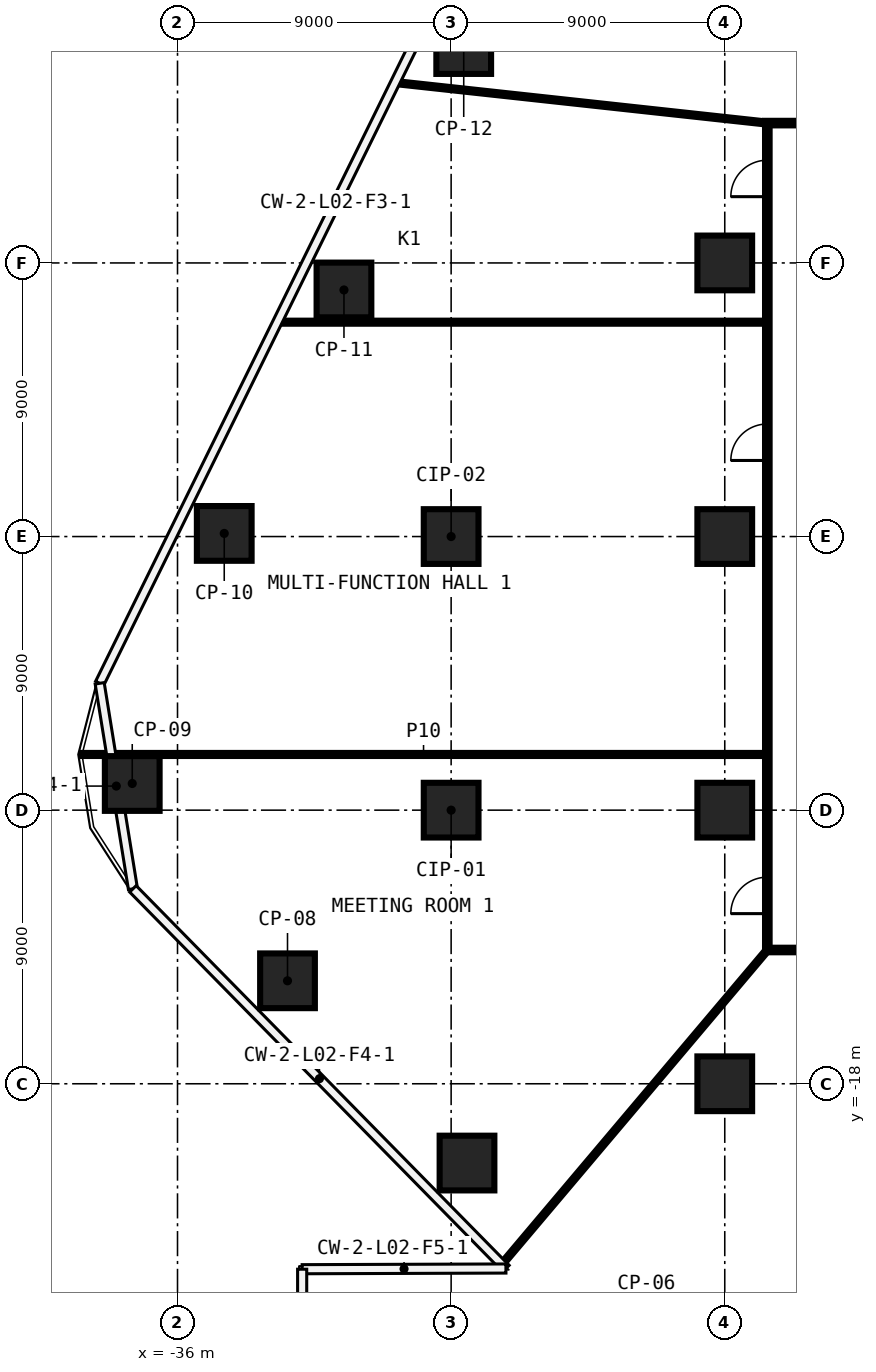
"""IFC4 building model, lengths in metres.
Left out: names, types, materials, properties, quantities, classifications, styles, units other than length and angle.
Written with IfcOpenShell. Run it as: python <this file> out.ifc"""

import sys

from ifc_helpers import new_model, si_unit, direction, frame, frame_2d, origin, origin_2d, place, context, subcontext, project, spatial, rectangle, extrude, element, fill, save


model = new_model("IFC4")
c1 = context("Model", 3, precision=1e-05, world=origin(), true_north=direction((0.0, 1.0)))
c2 = subcontext(c1, "Body", "Model", "MODEL_VIEW")
j1 = project(units=[si_unit("LENGTHUNIT", "METRE"), si_unit("PLANEANGLEUNIT", "RADIAN")], contexts=[c1])
p1 = place(None, origin())
s1 = spatial("IfcSite", under=j1, at=p1, CompositionType="ELEMENT")
p2 = place(p1, origin())
s2 = spatial("IfcBuilding", under=s1, at=p2, CompositionType="ELEMENT")
p3 = place(p2, frame((0.0, 0.0, 19.0)))
s3 = spatial("IfcBuildingStorey", under=s2, at=p3, CompositionType="ELEMENT", Elevation=19.0)
for number, where, z_axis, x_axis in (
    (1, (-26.478, -20.608, 0.0), (0.0, 0.0, 1.0), (1.0, 0.0, 0.0)),
    (2, (-32.382, -14.613, 0.0), (0.0, 0.0, 1.0), (1.0, 0.0, 0.0)),
    (3, (-37.489, -8.123, 0.0), (0.0, 0.0, 1.0), (1.0, 0.0, 0.0)),
    (4, (-34.463, 0.103, 0.0), (0.0, 0.0, 1.0), (1.0, 0.0, 0.0)),
    (5, (-30.525, 8.111, 0.0), (0.0, 0.0, 1.0), (1.0, 0.0, 0.0)),
    (6, (-26.586, 16.118, 0.0), (0.0, 0.0, 1.0), (1.0, 0.0, 0.0)),
    (7, (-27.0, -9.0, 0.0), (0.0, 0.0, 1.0), (1.0, 0.0, 0.0)),
    (8, (-27.0, 0.0, 0.0), (0.0, 0.0, 1.0), (1.0, 0.0, 0.0)),
    (9, (-18.0, -18.0, 0.0), (0.0, 0.0, 1.0), (1.0, 0.0, 0.0)),
    (10, (-18.0, -9.0, 0.0), (0.0, 0.0, 1.0), (1.0, 0.0, 0.0)),
    (11, (-18.0, 0.0, 0.0), (0.0, 0.0, 1.0), (1.0, 0.0, 0.0)),
    (12, (-18.0, 9.0, 0.0), (0.0, 0.0, 1.0), (1.0, 0.0, 0.0)),
):
    element("IfcColumn", number, at=place(p3, frame(where, z_axis=z_axis, x_axis=x_axis)), inside=s3, PredefinedType="COLUMN", context=c2, shape_type="SweptSolid", body=[
        extrude(rectangle(XDim=1.8, YDim=1.8, at=origin_2d()), origin(), (0.0, 0.0, 1.0), 7.55),
    ])
p4 = place(p3, frame((16.675, -13.6, 0.0), z_axis=(0.0, 0.0, 1.0), x_axis=(-1.0, 0.0, 0.0)))
e13 = element("IfcWall", 13, at=p4, inside=s3, PredefinedType="PARTITIONING", context=c2, shape_type="SweptSolid", body=[
    extrude(rectangle(XDim=33.35, YDim=0.15, at=frame_2d((16.675, 0.0))), origin(), (0.0, 0.0, 1.0), 7.55),
])
p5 = place(p4, frame((25.853, 0.0, 0.0)))
e14 = element("IfcOpeningElement", 14, at=p5, cuts=e13, PredefinedType="OPENING", context=c2, shape_type="SweptSolid", body=[
    extrude(rectangle(XDim=1.2, YDim=2.1, at=frame_2d((0.6, 1.05))), frame((0.0, 0.085, 0.0), z_axis=(0.0, -1.0, 0.0), x_axis=(1.0, 0.0, 0.0)), (0.0, 0.0, 1.0), 0.17),
])
p6 = place(p4, frame((14.742, 0.0, 0.0)))
e15 = element("IfcOpeningElement", 15, at=p6, cuts=e13, PredefinedType="OPENING", context=c2, shape_type="SweptSolid", body=[
    extrude(rectangle(XDim=1.2, YDim=2.1, at=frame_2d((0.6, 1.05))), frame((0.0, 0.085, 0.0), z_axis=(0.0, -1.0, 0.0), x_axis=(1.0, 0.0, 0.0)), (0.0, 0.0, 1.0), 0.17),
])
p7 = place(p4, frame((1.764, 0.0, 0.0)))
e16 = element("IfcOpeningElement", 16, at=p7, cuts=e13, PredefinedType="OPENING", context=c2, shape_type="SweptSolid", body=[
    extrude(rectangle(XDim=1.2, YDim=2.1, at=frame_2d((0.6, 1.05))), frame((0.0, 0.085, 0.0), z_axis=(0.0, -1.0, 0.0), x_axis=(1.0, 0.0, 0.0)), (0.0, 0.0, 1.0), 0.17),
])
p8 = place(p3, frame((-39.14, -7.168, 0.0), z_axis=(0.0, 0.0, 1.0), x_axis=(1.0, 0.0, 0.0)))
e17 = element("IfcWall", 17, at=p8, inside=s3, PredefinedType="PARTITIONING", context=c2, shape_type="SweptSolid", body=[
    extrude(rectangle(XDim=22.465, YDim=0.1, at=frame_2d((11.232, 0.0))), origin(), (0.0, 0.0, 1.0), 7.55),
])
p9 = place(p3, frame((-32.695, 7.051, 0.0), z_axis=(0.0, 0.0, 1.0), x_axis=(1.0, 0.0, 0.0)))
e18 = element("IfcWall", 18, at=p9, inside=s3, PredefinedType="PARTITIONING", context=c2, shape_type="SweptSolid", body=[
    extrude(rectangle(XDim=16.02, YDim=0.1, at=frame_2d((8.01, 0.0))), origin(), (0.0, 0.0, 1.0), 7.55),
])
p10 = place(p3, frame((-16.675, 13.6, 0.0), z_axis=(0.0, 0.0, 1.0), x_axis=(1.0, 0.0, 0.0)))
e19 = element("IfcWall", 19, at=p10, inside=s3, PredefinedType="PARTITIONING", context=c2, shape_type="SweptSolid", body=[
    extrude(rectangle(XDim=33.35, YDim=0.15, at=frame_2d((16.675, 0.0))), origin(), (0.0, 0.0, 1.0), 7.55),
])
p11 = place(p10, frame((27.447, 0.0, 0.0)))
e20 = element("IfcOpeningElement", 20, at=p11, cuts=e19, PredefinedType="OPENING", context=c2, shape_type="SweptSolid", body=[
    extrude(rectangle(XDim=1.2, YDim=2.1, at=frame_2d((0.6, 1.05))), frame((0.0, 0.085, 0.0), z_axis=(0.0, -1.0, 0.0), x_axis=(1.0, 0.0, 0.0)), (0.0, 0.0, 1.0), 0.17),
])
p12 = place(p10, frame((19.346, 0.0, 0.0)))
e21 = element("IfcOpeningElement", 21, at=p12, cuts=e19, PredefinedType="OPENING", context=c2, shape_type="SweptSolid", body=[
    extrude(rectangle(XDim=1.2, YDim=2.1, at=frame_2d((0.6, 1.05))), frame((0.0, 0.085, 0.0), z_axis=(0.0, -1.0, 0.0), x_axis=(1.0, 0.0, 0.0)), (0.0, 0.0, 1.0), 0.17),
])
p13 = place(p3, frame((-25.304, -23.908, 0.0), z_axis=(0.0, 0.0, 1.0), x_axis=(0.645188329464, 0.764023572623, 0.0)))
e22 = element("IfcWall", 22, at=p13, inside=s3, PredefinedType="PARTITIONING", context=c2, shape_type="SweptSolid", body=[
    extrude(rectangle(XDim=13.491, YDim=0.1, at=frame_2d((6.746, 0.0))), origin(), (0.0, 0.0, 1.0), 7.55),
])
p14 = place(p3, frame((-16.6, -13.525, 0.0), z_axis=(0.0, 0.0, 1.0), x_axis=(0.0, 1.0, 0.0)))
e23 = element("IfcWall", 23, at=p14, inside=s3, PredefinedType="PARTITIONING", context=c2, shape_type="SweptSolid", body=[
    extrude(rectangle(XDim=27.05, YDim=0.15, at=frame_2d((13.525, 0.0))), origin(), (0.0, 0.0, 1.0), 7.55),
])
p15 = place(p14, frame((16.028, 0.0, 0.0)))
e24 = element("IfcOpeningElement", 24, at=p15, cuts=e23, PredefinedType="OPENING", context=c2, shape_type="SweptSolid", body=[
    extrude(rectangle(XDim=1.2, YDim=2.1, at=frame_2d((0.6, 1.05))), frame((0.0, 0.085, 0.0), z_axis=(0.0, -1.0, 0.0), x_axis=(1.0, 0.0, 0.0)), (0.0, 0.0, 1.0), 0.17),
])
p16 = place(p14, frame((1.121, 0.0, 0.0)))
e25 = element("IfcOpeningElement", 25, at=p16, cuts=e23, PredefinedType="OPENING", context=c2, shape_type="SweptSolid", body=[
    extrude(rectangle(XDim=1.2, YDim=2.1, at=frame_2d((0.6, 1.05))), frame((0.0, 0.085, 0.0), z_axis=(0.0, -1.0, 0.0), x_axis=(1.0, 0.0, 0.0)), (0.0, 0.0, 1.0), 0.17),
])
p17 = place(p14, frame((24.705, 0.0, 0.0)))
e26 = element("IfcOpeningElement", 26, at=p17, cuts=e23, PredefinedType="OPENING", context=c2, shape_type="SweptSolid", body=[
    extrude(rectangle(XDim=1.2, YDim=2.1, at=frame_2d((0.6, 1.05))), frame((0.0, 0.085, 0.0), z_axis=(0.0, -1.0, 0.0), x_axis=(1.0, 0.0, 0.0)), (0.0, 0.0, 1.0), 0.17),
])
p18 = place(p3, frame((-28.819, 14.931, 0.0), z_axis=(0.0, 0.0, 1.0), x_axis=(0.994112645196, -0.108351505116, 0.0)))
e27 = element("IfcWall", 27, at=p18, inside=s3, PredefinedType="PARTITIONING", context=c2, shape_type="SweptSolid", body=[
    extrude(rectangle(XDim=12.291, YDim=0.1, at=frame_2d((6.146, 0.0))), origin(), (0.0, 0.0, 1.0), 7.55),
])
p19 = place(p15, origin())
e28 = element("IfcDoor", 28, at=p19, inside=s3, OperationType="SINGLE_SWING_RIGHT", PredefinedType="DOOR", context=c2, shape_type="SweptSolid", body=[
    extrude(rectangle(XDim=1.2, YDim=2.1, at=frame_2d((0.6, 1.05))), frame((0.0, 0.025, 0.0), z_axis=(0.0, -1.0, 0.0), x_axis=(1.0, 0.0, 0.0)), (0.0, 0.0, 1.0), 0.05),
])
fill(e24, e28)
p20 = place(p16, origin())
e29 = element("IfcDoor", 29, at=p20, inside=s3, OperationType="SINGLE_SWING_LEFT", PredefinedType="DOOR", context=c2, shape_type="SweptSolid", body=[
    extrude(rectangle(XDim=1.2, YDim=2.1, at=frame_2d((0.6, 1.05))), frame((0.0, 0.025, 0.0), z_axis=(0.0, -1.0, 0.0), x_axis=(1.0, 0.0, 0.0)), (0.0, 0.0, 1.0), 0.05),
])
fill(e25, e29)
p21 = place(p17, origin())
e30 = element("IfcDoor", 30, at=p21, inside=s3, OperationType="SINGLE_SWING_LEFT", PredefinedType="DOOR", context=c2, shape_type="SweptSolid", body=[
    extrude(rectangle(XDim=1.2, YDim=2.1, at=frame_2d((0.6, 1.05))), frame((0.0, 0.025, 0.0), z_axis=(0.0, -1.0, 0.0), x_axis=(1.0, 0.0, 0.0)), (0.0, 0.0, 1.0), 0.05),
])
fill(e26, e30)
save(model, sys.argv[1])
